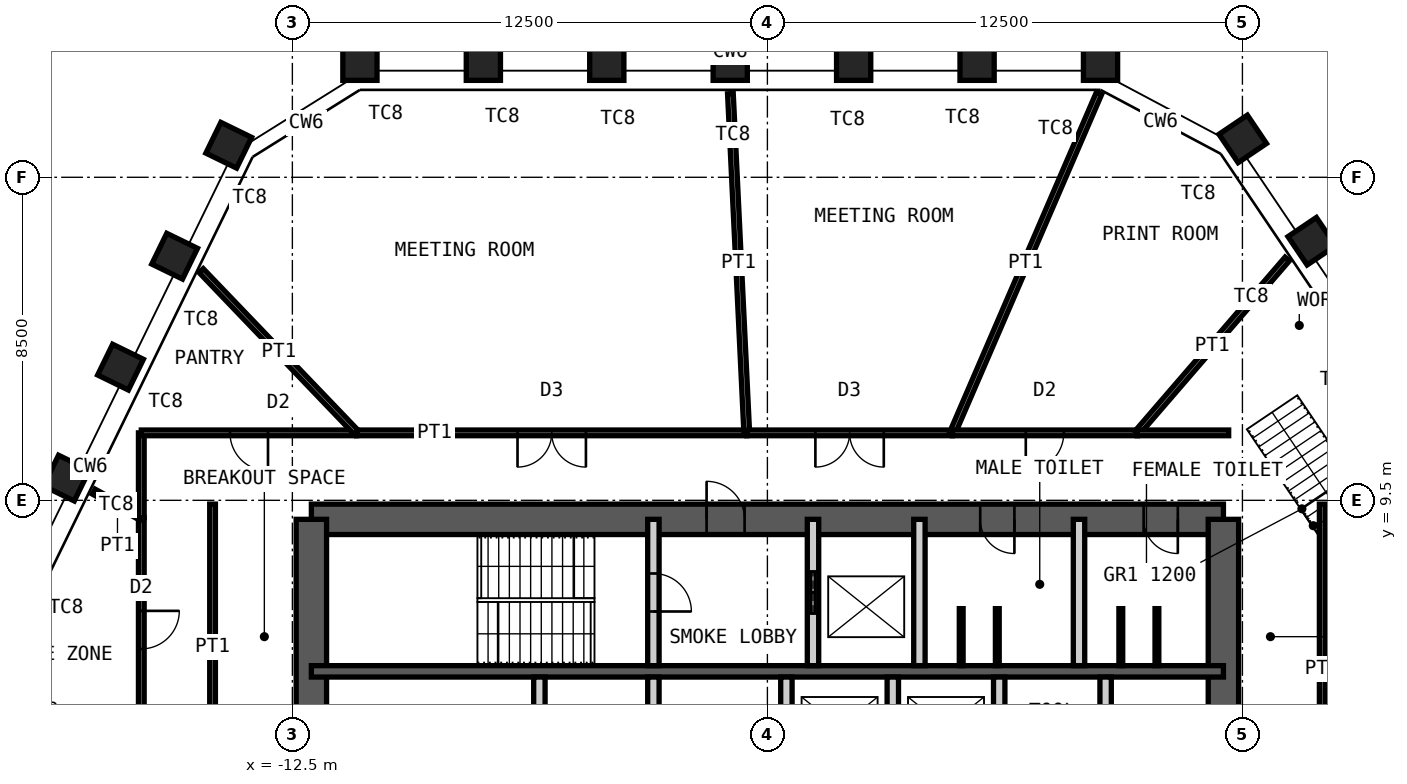
"""IFC4 building model, lengths in metres.
Left out: names, types, materials, properties, quantities, classifications, styles, units other than length and angle.
Written with IfcOpenShell. Run it as: python <this file> out.ifc"""

import sys

from ifc_helpers import new_model, si_unit, direction, frame, frame_2d, origin, origin_2d, place, context, subcontext, project, spatial, rectangle, hollow_rectangle, extrude, element, fill, save


model = new_model("IFC4")
c1 = context("Model", 3, precision=1e-05, world=origin(), true_north=direction((0.0, 1.0)))
c2 = subcontext(c1, "Body", "Model", "MODEL_VIEW")
j1 = project(units=[si_unit("LENGTHUNIT", "METRE"), si_unit("PLANEANGLEUNIT", "RADIAN")], contexts=[c1])
p1 = place(None, origin())
s1 = spatial("IfcSite", under=j1, at=p1, CompositionType="ELEMENT")
p2 = place(p1, origin())
s2 = spatial("IfcBuilding", under=s1, at=p2, CompositionType="ELEMENT")
p3 = place(p2, frame((0.0, 0.0, 325.0)))
s3 = spatial("IfcBuildingStorey", under=s2, at=p3, CompositionType="ELEMENT", Elevation=325.0)
for number, where, z_axis, x_axis in (
    (1, (-10.722, 21.0, 0.0), (0.0, 0.0, 1.0), (-1.0, 0.0, 0.0)),
    (2, (-7.474, 21.0, 0.0), (0.0, 0.0, 1.0), (-1.0, 0.0, 0.0)),
    (3, (-4.226, 21.0, 0.0), (0.0, 0.0, 1.0), (-1.0, 0.0, 0.0)),
    (4, (-0.978, 21.0, 0.0), (0.0, 0.0, 1.0), (-1.0, 0.0, 0.0)),
    (5, (2.27, 21.0, 0.0), (0.0, 0.0, 1.0), (-1.0, 0.0, 0.0)),
    (6, (5.518, 21.0, 0.0), (0.0, 0.0, 1.0), (-1.0, 0.0, 0.0)),
    (7, (8.766, 21.0, 0.0), (0.0, 0.0, 1.0), (-1.0, 0.0, 0.0)),
    (8, (12.508, 19.01, 0.0), (0.0, 0.0, 1.0), (-0.559, 0.829, 0.0)),
    (9, (14.324, 16.318, 0.0), (0.0, 0.0, 1.0), (-0.559, 0.829, 0.0)),
    (10, (-18.446, 10.085, 0.0), (0.0, 0.0, 1.0), (-0.438, -0.899, 0.0)),
    (11, (-17.022, 13.004, 0.0), (0.0, 0.0, 1.0), (-0.438, -0.899, 0.0)),
    (12, (-15.598, 15.924, 0.0), (0.0, 0.0, 1.0), (-0.438, -0.899, 0.0)),
    (13, (-14.174, 18.843, 0.0), (0.0, 0.0, 1.0), (-0.438, -0.899, 0.0)),
):
    element("IfcColumn", number, at=place(p3, frame(where, z_axis=z_axis, x_axis=x_axis)), inside=s3, PredefinedType="COLUMN", context=c2, shape_type="SweptSolid", body=[
        extrude(hollow_rectangle(XDim=0.9, YDim=0.9, WallThickness=0.05, at=origin_2d()), origin(), (0.0, 0.0, 1.0), 4.2),
    ])
p4 = place(p3, frame((-12.0, 9.0, 0.0), z_axis=(0.0, 0.0, 1.0), x_axis=(1.0, 0.0, 0.0)))
e14 = element("IfcWall", 14, at=p4, inside=s3, PredefinedType="SHEAR", context=c2, shape_type="SweptSolid", body=[
    extrude(rectangle(XDim=24.0, YDim=0.8, at=frame_2d((12.0, 0.0))), origin(), (0.0, 0.0, 1.0), 4.2),
])
p5 = place(p4, frame((10.4, 0.0, 0.0)))
e15 = element("IfcOpeningElement", 15, at=p5, cuts=e14, PredefinedType="OPENING", context=c2, shape_type="SweptSolid", body=[
    extrude(rectangle(XDim=1.0, YDim=2.1, at=frame_2d((0.5, 1.05))), frame((0.0, 0.41, 0.0), z_axis=(0.0, -1.0, 0.0), x_axis=(1.0, 0.0, 0.0)), (0.0, 0.0, 1.0), 0.82),
])
p6 = place(p4, frame((17.6, 0.0, 0.0)))
e16 = element("IfcOpeningElement", 16, at=p6, cuts=e14, PredefinedType="OPENING", context=c2, shape_type="SweptSolid", body=[
    extrude(rectangle(XDim=0.9, YDim=2.1, at=frame_2d((0.45, 1.05))), frame((0.0, 0.41, 0.0), z_axis=(0.0, -1.0, 0.0), x_axis=(1.0, 0.0, 0.0)), (0.0, 0.0, 1.0), 0.82),
])
p7 = place(p4, frame((21.9, 0.0, 0.0)))
e17 = element("IfcOpeningElement", 17, at=p7, cuts=e14, PredefinedType="OPENING", context=c2, shape_type="SweptSolid", body=[
    extrude(rectangle(XDim=0.9, YDim=2.1, at=frame_2d((0.45, 1.05))), frame((0.0, 0.41, 0.0), z_axis=(0.0, -1.0, 0.0), x_axis=(1.0, 0.0, 0.0)), (0.0, 0.0, 1.0), 0.82),
])
p8 = place(p3, frame((12.0, -9.0, 0.0), z_axis=(0.0, 0.0, 1.0), x_axis=(0.0, 1.0, 0.0)))
e18 = element("IfcWall", 18, at=p8, inside=s3, PredefinedType="SHEAR", context=c2, shape_type="SweptSolid", body=[
    extrude(rectangle(XDim=18.0, YDim=0.8, at=frame_2d((9.0, 0.0))), origin(), (0.0, 0.0, 1.0), 4.2),
])
p9 = place(p8, frame((8.1, 0.0, 0.0)))
e19 = element("IfcOpeningElement", 19, at=p9, cuts=e18, PredefinedType="OPENING", context=c2, shape_type="SweptSolid", body=[
    extrude(rectangle(XDim=1.8, YDim=2.1, at=frame_2d((0.9, 1.05))), frame((0.0, 0.41, 0.0), z_axis=(0.0, -1.0, 0.0), x_axis=(1.0, 0.0, 0.0)), (0.0, 0.0, 1.0), 0.82),
])
p10 = place(p3, frame((-12.0, -9.0, 0.0), z_axis=(0.0, 0.0, 1.0), x_axis=(0.0, 1.0, 0.0)))
e20 = element("IfcWall", 20, at=p10, inside=s3, PredefinedType="SHEAR", context=c2, shape_type="SweptSolid", body=[
    extrude(rectangle(XDim=18.0, YDim=0.8, at=frame_2d((9.0, 0.0))), origin(), (0.0, 0.0, 1.0), 4.2),
])
p11 = place(p10, frame((8.1, 0.0, 0.0)))
e21 = element("IfcOpeningElement", 21, at=p11, cuts=e20, PredefinedType="OPENING", context=c2, shape_type="SweptSolid", body=[
    extrude(rectangle(XDim=1.8, YDim=2.1, at=frame_2d((0.9, 1.05))), frame((0.0, 0.41, 0.0), z_axis=(0.0, -1.0, 0.0), x_axis=(1.0, 0.0, 0.0)), (0.0, 0.0, 1.0), 0.82),
])
p12 = place(p3, frame((-12.0, 5.0, 0.0), z_axis=(0.0, 0.0, 1.0), x_axis=(1.0, 0.0, 0.0)))
e22 = element("IfcWall", 22, at=p12, inside=s3, PredefinedType="SHEAR", context=c2, shape_type="SweptSolid", body=[
    extrude(rectangle(XDim=24.0, YDim=0.3, at=frame_2d((12.0, 0.0))), origin(), (0.0, 0.0, 1.0), 4.2),
])
p13 = place(p3, frame((-3.0, 5.15, 0.0), z_axis=(0.0, 0.0, 1.0), x_axis=(0.0, 1.0, 0.0)))
e23 = element("IfcWall", 23, at=p13, inside=s3, PredefinedType="PARTITIONING", context=c2, shape_type="SweptSolid", body=[
    extrude(rectangle(XDim=3.85, YDim=0.3, at=frame_2d((1.925, 0.0))), origin(), (0.0, 0.0, 1.0), 3.98),
])
p14 = place(p13, frame((1.425, 0.0, 0.0)))
e24 = element("IfcOpeningElement", 24, at=p14, cuts=e23, PredefinedType="OPENING", context=c2, shape_type="SweptSolid", body=[
    extrude(rectangle(XDim=1.0, YDim=2.1, at=frame_2d((0.5, 1.05))), frame((0.0, 0.16, 0.0), z_axis=(0.0, -1.0, 0.0), x_axis=(1.0, 0.0, 0.0)), (0.0, 0.0, 1.0), 0.32),
])
p15 = place(p3, frame((1.2, 5.15, 0.0), z_axis=(0.0, 0.0, 1.0), x_axis=(0.0, 1.0, 0.0)))
e25 = element("IfcWall", 25, at=p15, inside=s3, PredefinedType="PARTITIONING", context=c2, shape_type="SweptSolid", body=[
    extrude(rectangle(XDim=3.85, YDim=0.3, at=frame_2d((1.925, 0.0))), origin(), (0.0, 0.0, 1.0), 3.98),
])
p16 = place(p15, frame((1.375, 0.0, 0.0)))
e26 = element("IfcOpeningElement", 26, at=p16, cuts=e25, PredefinedType="OPENING", context=c2, shape_type="SweptSolid", body=[
    extrude(rectangle(XDim=1.1, YDim=2.4, at=frame_2d((0.55, 1.2))), frame((0.0, 0.16, 0.0), z_axis=(0.0, -1.0, 0.0), x_axis=(1.0, 0.0, 0.0)), (0.0, 0.0, 1.0), 0.32),
])
for number, where, z_axis, x_axis in (
    (27, (4.0, 5.15, 0.0), (0.0, 0.0, 1.0), (0.0, 1.0, 0.0)),
    (28, (8.2, 5.15, 0.0), (0.0, 0.0, 1.0), (0.0, 1.0, 0.0)),
):
    element("IfcWall", number, at=place(p3, frame(where, z_axis=z_axis, x_axis=x_axis)), inside=s3, PredefinedType="PARTITIONING", context=c2, shape_type="SweptSolid", body=[
        extrude(rectangle(XDim=3.85, YDim=0.3, at=frame_2d((1.925, 0.0))), origin(), (0.0, 0.0, 1.0), 3.98),
    ])
for number, where, z_axis, x_axis in (
    (29, (-6.0, 2.2, 0.0), (0.0, 0.0, 1.0), (0.0, 1.0, 0.0)),
    (30, (-3.0, 2.2, 0.0), (0.0, 0.0, 1.0), (0.0, 1.0, 0.0)),
    (31, (0.5, 2.2, 0.0), (0.0, 0.0, 1.0), (0.0, 1.0, 0.0)),
    (32, (3.3, 2.2, 0.0), (0.0, 0.0, 1.0), (0.0, 1.0, 0.0)),
    (33, (6.1, 2.2, 0.0), (0.0, 0.0, 1.0), (0.0, 1.0, 0.0)),
    (34, (8.9, 2.2, 0.0), (0.0, 0.0, 1.0), (0.0, 1.0, 0.0)),
):
    element("IfcWall", number, at=place(p3, frame(where, z_axis=z_axis, x_axis=x_axis)), inside=s3, PredefinedType="PARTITIONING", context=c2, shape_type="SweptSolid", body=[
        extrude(rectangle(XDim=2.65, YDim=0.3, at=frame_2d((1.325, 0.0))), origin(), (0.0, 0.0, 1.0), 3.98),
    ])
for number, where, z_axis, x_axis in (
    (35, (5.1, 5.15, 0.0), (0.0, 0.0, 1.0), (0.0, 1.0, 0.0)),
    (36, (6.05, 5.15, 0.0), (0.0, 0.0, 1.0), (0.0, 1.0, 0.0)),
    (37, (9.3, 5.15, 0.0), (0.0, 0.0, 1.0), (0.0, 1.0, 0.0)),
    (38, (10.25, 5.15, 0.0), (0.0, 0.0, 1.0), (0.0, 1.0, 0.0)),
):
    element("IfcWall", number, at=place(p3, frame(where, z_axis=z_axis, x_axis=x_axis)), inside=s3, PredefinedType="PARTITIONING", context=c2, shape_type="SweptSolid", body=[
        extrude(rectangle(XDim=1.5, YDim=0.1, at=frame_2d((0.75, 0.0))), origin(), (0.0, 0.0, 1.0), 2.1),
    ])
p17 = place(p3, frame((-16.475, 3.141, 0.0), z_axis=(0.0, 0.0, 1.0), x_axis=(0.0, 1.0, 0.0)))
e39 = element("IfcWall", 39, at=p17, inside=s3, PredefinedType="PARTITIONING", context=c2, shape_type="SweptSolid", body=[
    extrude(rectangle(XDim=5.901, YDim=0.15, at=frame_2d((2.95, 0.0))), origin(), (0.0, 0.0, 1.0), 4.03),
])
p18 = place(p17, frame((2.45, 0.0, 0.0)))
e40 = element("IfcOpeningElement", 40, at=p18, cuts=e39, PredefinedType="OPENING", context=c2, shape_type="SweptSolid", body=[
    extrude(rectangle(XDim=1.0, YDim=2.4, at=frame_2d((0.5, 1.2))), frame((0.0, 0.085, 0.0), z_axis=(0.0, -1.0, 0.0), x_axis=(1.0, 0.0, 0.0)), (0.0, 0.0, 1.0), 0.17),
])
p19 = place(p3, frame((-17.729, 9.73, 0.0), z_axis=(0.0, 0.0, 1.0), x_axis=(0.876633607687, -0.481158516369, 0.0)))
e41 = element("IfcWall", 41, at=p19, inside=s3, PredefinedType="PARTITIONING", context=c2, shape_type="SweptSolid", body=[
    extrude(rectangle(XDim=1.43, YDim=0.15, at=frame_2d((0.715, 0.0))), origin(), (0.0, 0.0, 1.0), 3.33),
])
p20 = place(p3, frame((-16.475, 9.042, 0.0), z_axis=(0.0, 0.0, 1.0), x_axis=(0.0, 1.0, 0.0)))
e42 = element("IfcWall", 42, at=p20, inside=s3, PredefinedType="PARTITIONING", context=c2, shape_type="SweptSolid", body=[
    extrude(rectangle(XDim=2.233, YDim=0.15, at=frame_2d((1.117, 0.0))), origin(), (0.0, 0.0, 1.0), 4.03),
])
p21 = place(p3, frame((-16.475, 11.275, 0.0), z_axis=(0.0, 0.0, 1.0), x_axis=(1.0, 0.0, 0.0)))
e43 = element("IfcWall", 43, at=p21, inside=s3, PredefinedType="PARTITIONING", context=c2, shape_type="SweptSolid", body=[
    extrude(rectangle(XDim=5.668, YDim=0.15, at=frame_2d((2.834, 0.0))), origin(), (0.0, 0.0, 1.0), 4.03),
])
p22 = place(p21, frame((2.334, 0.0, 0.0)))
e44 = element("IfcOpeningElement", 44, at=p22, cuts=e43, PredefinedType="OPENING", context=c2, shape_type="SweptSolid", body=[
    extrude(rectangle(XDim=1.0, YDim=2.4, at=frame_2d((0.5, 1.2))), frame((0.0, 0.085, 0.0), z_axis=(0.0, -1.0, 0.0), x_axis=(1.0, 0.0, 0.0)), (0.0, 0.0, 1.0), 0.17),
])
p23 = place(p3, frame((-14.9, 15.544, 0.0), z_axis=(0.0, 0.0, 1.0), x_axis=(0.691984258941, -0.72191258846, 0.0)))
e45 = element("IfcWall", 45, at=p23, inside=s3, PredefinedType="PARTITIONING", context=c2, shape_type="SweptSolid", body=[
    extrude(rectangle(XDim=5.914, YDim=0.15, at=frame_2d((2.957, 0.0))), origin(), (0.0, 0.0, 1.0), 4.03),
])
p24 = place(p3, frame((-10.807, 11.275, 0.0), z_axis=(0.0, 0.0, 1.0), x_axis=(1.0, 0.0, 0.0)))
e46 = element("IfcWall", 46, at=p24, inside=s3, PredefinedType="PARTITIONING", context=c2, shape_type="SweptSolid", body=[
    extrude(rectangle(XDim=10.264, YDim=0.15, at=frame_2d((5.132, 0.0))), origin(), (0.0, 0.0, 1.0), 4.03),
])
p25 = place(p24, frame((4.232, 0.0, 0.0)))
e47 = element("IfcOpeningElement", 47, at=p25, cuts=e46, PredefinedType="OPENING", context=c2, shape_type="SweptSolid", body=[
    extrude(rectangle(XDim=1.8, YDim=2.4, at=frame_2d((0.9, 1.2))), frame((0.0, 0.085, 0.0), z_axis=(0.0, -1.0, 0.0), x_axis=(1.0, 0.0, 0.0)), (0.0, 0.0, 1.0), 0.17),
])
p26 = place(p3, frame((-0.973, 20.2, 0.0), z_axis=(0.0, 0.0, 1.0), x_axis=(0.04814150135, -0.998840525734, 0.0)))
e48 = element("IfcWall", 48, at=p26, inside=s3, PredefinedType="PARTITIONING", context=c2, shape_type="SweptSolid", body=[
    extrude(rectangle(XDim=8.936, YDim=0.15, at=frame_2d((4.468, 0.0))), origin(), (0.0, 0.0, 1.0), 3.33),
])
p27 = place(p3, frame((-0.543, 11.275, 0.0), z_axis=(0.0, 0.0, 1.0), x_axis=(1.0, 0.0, 0.0)))
e49 = element("IfcWall", 49, at=p27, inside=s3, PredefinedType="PARTITIONING", context=c2, shape_type="SweptSolid", body=[
    extrude(rectangle(XDim=5.412, YDim=0.15, at=frame_2d((2.706, 0.0))), origin(), (0.0, 0.0, 1.0), 4.03),
])
p28 = place(p27, frame((1.806, 0.0, 0.0)))
e50 = element("IfcOpeningElement", 50, at=p28, cuts=e49, PredefinedType="OPENING", context=c2, shape_type="SweptSolid", body=[
    extrude(rectangle(XDim=1.8, YDim=2.4, at=frame_2d((0.9, 1.2))), frame((0.0, 0.085, 0.0), z_axis=(0.0, -1.0, 0.0), x_axis=(1.0, 0.0, 0.0)), (0.0, 0.0, 1.0), 0.17),
])
p29 = place(p3, frame((8.726, 20.208, 0.0), z_axis=(0.0, 0.0, 1.0), x_axis=(-0.39644322536, -0.918059240499, 0.0)))
e51 = element("IfcWall", 51, at=p29, inside=s3, PredefinedType="PARTITIONING", context=c2, shape_type="SweptSolid", body=[
    extrude(rectangle(XDim=9.731, YDim=0.15, at=frame_2d((4.865, 0.0))), origin(), (0.0, 0.0, 1.0), 2.93),
])
p30 = place(p3, frame((4.869, 11.275, 0.0), z_axis=(0.0, 0.0, 1.0), x_axis=(1.0, 0.0, 0.0)))
e52 = element("IfcWall", 52, at=p30, inside=s3, PredefinedType="PARTITIONING", context=c2, shape_type="SweptSolid", body=[
    extrude(rectangle(XDim=4.861, YDim=0.15, at=frame_2d((2.431, 0.0))), origin(), (0.0, 0.0, 1.0), 4.03),
])
p31 = place(p30, frame((1.931, 0.0, 0.0)))
e53 = element("IfcOpeningElement", 53, at=p31, cuts=e52, PredefinedType="OPENING", context=c2, shape_type="SweptSolid", body=[
    extrude(rectangle(XDim=1.0, YDim=2.4, at=frame_2d((0.5, 1.2))), frame((0.0, 0.085, 0.0), z_axis=(0.0, -1.0, 0.0), x_axis=(1.0, 0.0, 0.0)), (0.0, 0.0, 1.0), 0.17),
])
p32 = place(p3, frame((13.678, 15.85, 0.0), z_axis=(0.0, 0.0, 1.0), x_axis=(-0.65333269737, -0.757070925704, 0.0)))
e54 = element("IfcWall", 54, at=p32, inside=s3, PredefinedType="PARTITIONING", context=c2, shape_type="SweptSolid", body=[
    extrude(rectangle(XDim=6.044, YDim=0.15, at=frame_2d((3.022, 0.0))), origin(), (0.0, 0.0, 1.0), 3.33),
])
p33 = place(p3, frame((9.73, 11.275, 0.0), z_axis=(0.0, 0.0, 1.0), x_axis=(1.0, 0.0, 0.0)))
e55 = element("IfcWall", 55, at=p33, inside=s3, PredefinedType="PARTITIONING", context=c2, shape_type="SweptSolid", body=[
    extrude(rectangle(XDim=2.408, YDim=0.15, at=frame_2d((1.204, 0.0))), origin(), (0.0, 0.0, 1.0), 4.03),
])
for number, where, z_axis, x_axis in (
    (56, (14.6, 1.9, 0.0), (0.0, 0.0, 1.0), (0.0, 1.0, 0.0)),
    (57, (-14.6, 1.9, 0.0), (0.0, 0.0, 1.0), (0.0, 1.0, 0.0)),
):
    element("IfcWall", number, at=place(p3, frame(where, z_axis=z_axis, x_axis=x_axis)), inside=s3, PredefinedType="PARTITIONING", context=c2, shape_type="SweptSolid", body=[
        extrude(rectangle(XDim=7.5, YDim=0.15, at=frame_2d((3.75, 0.0))), origin(), (0.0, 0.0, 1.0), 4.03),
    ])
p34 = place(p5, origin())
e58 = element("IfcDoor", 58, at=p34, inside=s3, OperationType="SINGLE_SWING_RIGHT", PredefinedType="DOOR", context=c2, shape_type="SweptSolid", body=[
    extrude(rectangle(XDim=1.0, YDim=2.1, at=frame_2d((0.5, 1.05))), frame((0.0, 0.025, 0.0), z_axis=(0.0, -1.0, 0.0), x_axis=(1.0, 0.0, 0.0)), (0.0, 0.0, 1.0), 0.05),
])
fill(e15, e58)
p35 = place(p6, origin())
e59 = element("IfcDoor", 59, at=p35, inside=s3, OperationType="SINGLE_SWING_RIGHT", PredefinedType="DOOR", context=c2, shape_type="SweptSolid", body=[
    extrude(rectangle(XDim=0.9, YDim=2.1, at=frame_2d((0.45, 1.05))), frame((0.0, 0.025, 0.0), z_axis=(0.0, -1.0, 0.0), x_axis=(1.0, 0.0, 0.0)), (0.0, 0.0, 1.0), 0.05),
])
fill(e16, e59)
p36 = place(p7, origin())
e60 = element("IfcDoor", 60, at=p36, inside=s3, OperationType="SINGLE_SWING_RIGHT", PredefinedType="DOOR", context=c2, shape_type="SweptSolid", body=[
    extrude(rectangle(XDim=0.9, YDim=2.1, at=frame_2d((0.45, 1.05))), frame((0.0, 0.025, 0.0), z_axis=(0.0, -1.0, 0.0), x_axis=(1.0, 0.0, 0.0)), (0.0, 0.0, 1.0), 0.05),
])
fill(e17, e60)
p37 = place(p14, origin())
e61 = element("IfcDoor", 61, at=p37, inside=s3, OperationType="SINGLE_SWING_LEFT", PredefinedType="DOOR", context=c2, shape_type="SweptSolid", body=[
    extrude(rectangle(XDim=1.0, YDim=2.1, at=frame_2d((0.5, 1.05))), frame((0.0, 0.025, 0.0), z_axis=(0.0, -1.0, 0.0), x_axis=(1.0, 0.0, 0.0)), (0.0, 0.0, 1.0), 0.05),
])
fill(e24, e61)
p38 = place(p16, origin())
e62 = element("IfcDoor", 62, at=p38, inside=s3, OperationType="DOUBLE_DOOR_SLIDING", PredefinedType="DOOR", context=c2, shape_type="SweptSolid", body=[
    extrude(rectangle(XDim=1.1, YDim=2.4, at=frame_2d((0.55, 1.2))), frame((0.0, 0.025, 0.0), z_axis=(0.0, -1.0, 0.0), x_axis=(1.0, 0.0, 0.0)), (0.0, 0.0, 1.0), 0.05),
])
fill(e26, e62)
p39 = place(p18, origin())
e63 = element("IfcDoor", 63, at=p39, inside=s3, OperationType="SINGLE_SWING_RIGHT", PredefinedType="DOOR", context=c2, shape_type="SweptSolid", body=[
    extrude(rectangle(XDim=1.0, YDim=2.4, at=frame_2d((0.5, 1.2))), frame((0.0, 0.025, 0.0), z_axis=(0.0, -1.0, 0.0), x_axis=(1.0, 0.0, 0.0)), (0.0, 0.0, 1.0), 0.05),
])
fill(e40, e63)
p40 = place(p22, origin())
e64 = element("IfcDoor", 64, at=p40, inside=s3, OperationType="SINGLE_SWING_RIGHT", PredefinedType="DOOR", context=c2, shape_type="SweptSolid", body=[
    extrude(rectangle(XDim=1.0, YDim=2.4, at=frame_2d((0.5, 1.2))), frame((0.0, 0.025, 0.0), z_axis=(0.0, -1.0, 0.0), x_axis=(1.0, 0.0, 0.0)), (0.0, 0.0, 1.0), 0.05),
])
fill(e44, e64)
p41 = place(p25, origin())
e65 = element("IfcDoor", 65, at=p41, inside=s3, OperationType="DOUBLE_DOOR_DOUBLE_SWING", PredefinedType="DOOR", context=c2, shape_type="SweptSolid", body=[
    extrude(rectangle(XDim=1.8, YDim=2.4, at=frame_2d((0.9, 1.2))), frame((0.0, 0.025, 0.0), z_axis=(0.0, -1.0, 0.0), x_axis=(1.0, 0.0, 0.0)), (0.0, 0.0, 1.0), 0.05),
])
fill(e47, e65)
p42 = place(p28, origin())
e66 = element("IfcDoor", 66, at=p42, inside=s3, OperationType="DOUBLE_DOOR_DOUBLE_SWING", PredefinedType="DOOR", context=c2, shape_type="SweptSolid", body=[
    extrude(rectangle(XDim=1.8, YDim=2.4, at=frame_2d((0.9, 1.2))), frame((0.0, 0.025, 0.0), z_axis=(0.0, -1.0, 0.0), x_axis=(1.0, 0.0, 0.0)), (0.0, 0.0, 1.0), 0.05),
])
fill(e50, e66)
p43 = place(p31, origin())
e67 = element("IfcDoor", 67, at=p43, inside=s3, OperationType="SINGLE_SWING_LEFT", PredefinedType="DOOR", context=c2, shape_type="SweptSolid", body=[
    extrude(rectangle(XDim=1.0, YDim=2.4, at=frame_2d((0.5, 1.2))), frame((0.0, 0.025, 0.0), z_axis=(0.0, -1.0, 0.0), x_axis=(1.0, 0.0, 0.0)), (0.0, 0.0, 1.0), 0.05),
])
fill(e53, e67)
save(model, sys.argv[1])
